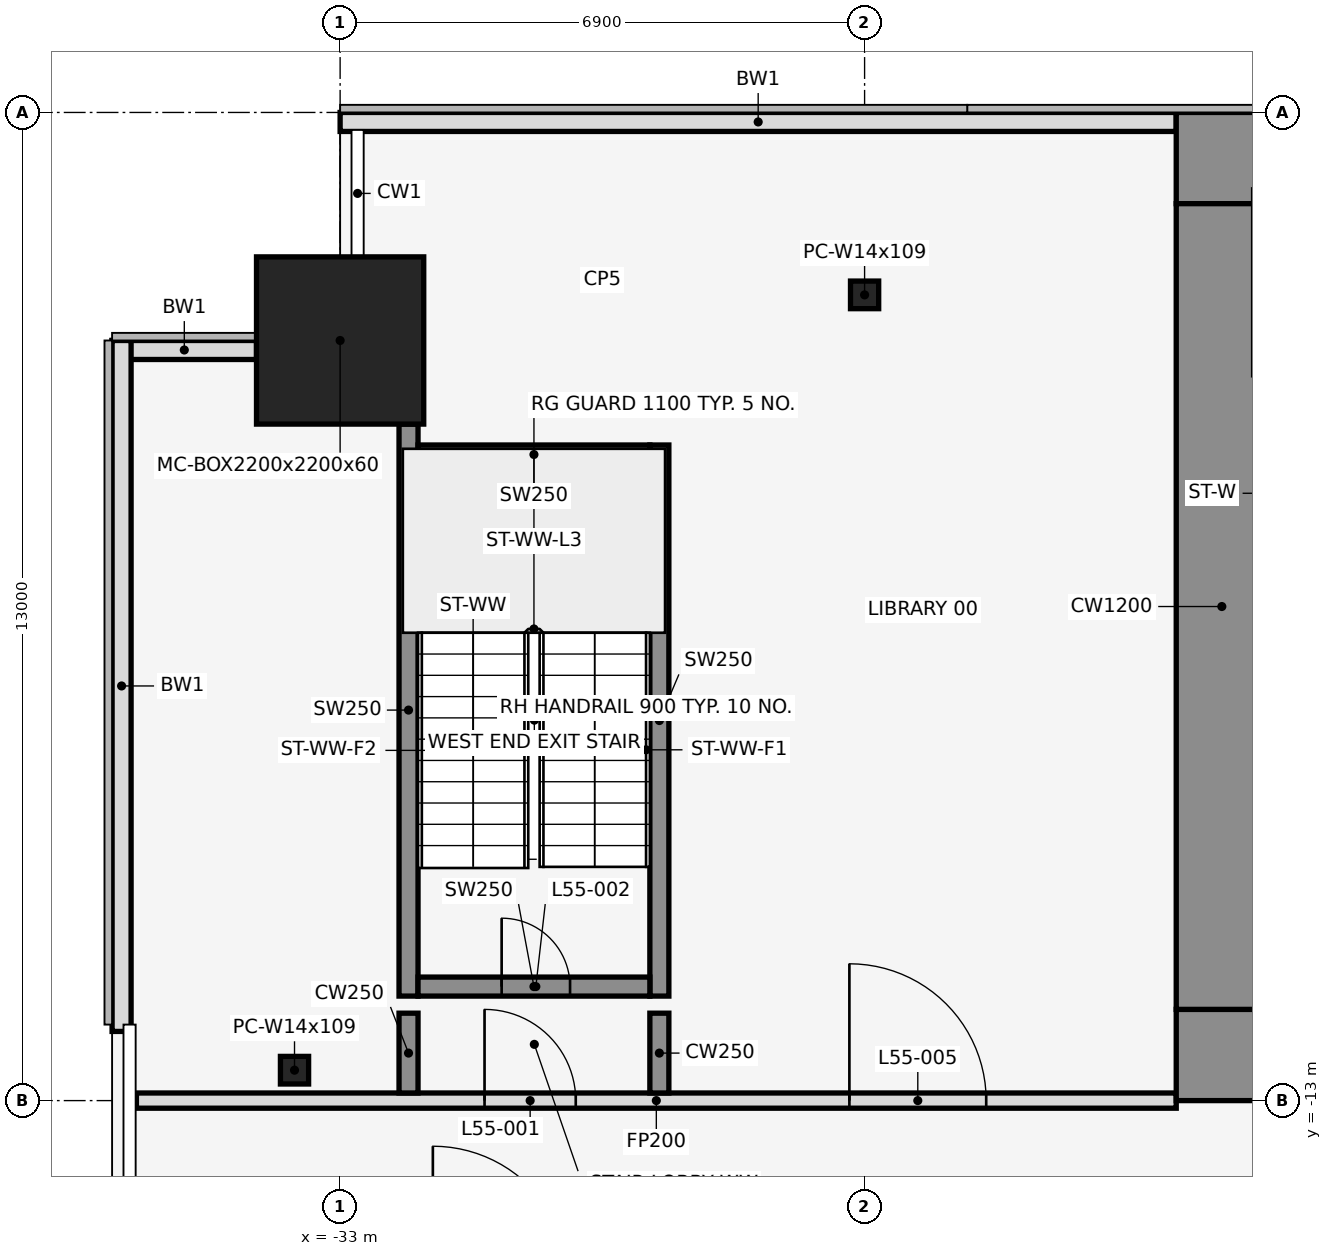
"""IFC4 building model, lengths in metres.
Left out: names, types, materials, properties, quantities, classifications, styles, units other than length and angle.
Written with IfcOpenShell. Run it as: python <this file> out.ifc"""

import sys

from ifc_helpers import new_model, si_unit, direction, frame, frame_2d, origin, origin_2d, place, context, subcontext, project, spatial, rectangle, hollow_rectangle, i_section, extrude, element, fill, save


model = new_model("IFC4")
c1 = context("Model", 3, precision=1e-05, world=origin(), true_north=direction((0.0, 1.0)))
c2 = subcontext(c1, "Body", "Model", "MODEL_VIEW")
j1 = project(units=[si_unit("LENGTHUNIT", "METRE"), si_unit("PLANEANGLEUNIT", "RADIAN")], contexts=[c1])
p1 = place(None, origin())
s1 = spatial("IfcSite", under=j1, at=p1, CompositionType="ELEMENT")
p2 = place(p1, origin())
s2 = spatial("IfcBuilding", under=s1, at=p2, CompositionType="ELEMENT")
p3 = place(p2, frame((0.0, 0.0, 245.6)))
s3 = spatial("IfcBuildingStorey", under=s2, at=p3, CompositionType="ELEMENT", Elevation=245.6)
p4 = place(p3, frame((-33.0, -3.0, 0.0), z_axis=(0.0, 0.0, 1.0), x_axis=(1.0, 0.0, 0.0)))
e1 = element("IfcColumn", 1, at=p4, inside=s3, PredefinedType="COLUMN", context=c2, shape_type="SweptSolid", body=[
    extrude(hollow_rectangle(XDim=2.2, YDim=2.2, WallThickness=0.06, at=origin_2d()), origin(), (0.0, 0.0, 1.0), 4.2),
])
for number, where, z_axis, x_axis in (
    (2, (-26.1, -2.4, 0.0), (0.0, 0.0, 1.0), (1.0, 0.0, 0.0)),
    (3, (-33.6, -12.6, 0.0), (0.0, 0.0, 1.0), (1.0, 0.0, 0.0)),
):
    element("IfcColumn", number, at=place(p3, frame(where, z_axis=z_axis, x_axis=x_axis)), inside=s3, PredefinedType="COLUMN", context=c2, shape_type="SweptSolid", body=[
        extrude(i_section(OverallWidth=0.371, OverallDepth=0.363, WebThickness=0.013, FlangeThickness=0.022, at=origin_2d()), origin(), (0.0, 0.0, 1.0), 4.2),
    ])
p5 = place(p3, frame((-22.0, -0.125, 0.0), z_axis=(0.0, 0.0, 1.0), x_axis=(-1.0, 0.0, 0.0)))
e4 = element("IfcWall", 4, at=p5, inside=s3, PredefinedType="STANDARD", context=c2, shape_type="SweptSolid", body=[
    extrude(rectangle(XDim=11.0, YDim=0.25, at=frame_2d((5.5, 0.0))), origin(), (0.0, 0.0, 1.0), 4.05),
])
p6 = place(p3, frame((-34.1, -3.125, 0.0), z_axis=(0.0, 0.0, 1.0), x_axis=(-1.0, 0.0, 0.0)))
e5 = element("IfcWall", 5, at=p6, inside=s3, PredefinedType="STANDARD", context=c2, shape_type="SweptSolid", body=[
    extrude(rectangle(XDim=1.9, YDim=0.25, at=frame_2d((0.95, 0.0))), origin(), (0.0, 0.0, 1.0), 4.05),
])
p7 = place(p3, frame((-35.875, -3.0, 0.0), z_axis=(0.0, 0.0, 1.0), x_axis=(0.0, -1.0, 0.0)))
e6 = element("IfcWall", 6, at=p7, inside=s3, PredefinedType="STANDARD", context=c2, shape_type="SweptSolid", body=[
    extrude(rectangle(XDim=9.09, YDim=0.25, at=frame_2d((4.545, 0.0))), origin(), (0.0, 0.0, 1.0), 4.05),
])
p8 = place(p3, frame((-32.1, -11.625, 0.0), z_axis=(0.0, 0.0, 1.0), x_axis=(0.0, 1.0, 0.0)))
e7 = element("IfcWall", 7, at=p8, inside=s3, PredefinedType="SHEAR", context=c2, shape_type="SweptSolid", body=[
    extrude(rectangle(XDim=7.525, YDim=0.25, at=frame_2d((3.762, 0.0))), origin(), (0.0, 0.0, 1.0), 4.2),
])
p9 = place(p3, frame((-28.8, -11.625, 0.0), z_axis=(0.0, 0.0, 1.0), x_axis=(0.0, 1.0, 0.0)))
e8 = element("IfcWall", 8, at=p9, inside=s3, PredefinedType="SHEAR", context=c2, shape_type="SweptSolid", body=[
    extrude(rectangle(XDim=7.25, YDim=0.25, at=frame_2d((3.625, 0.0))), origin(), (0.0, 0.0, 1.0), 4.2),
])
p10 = place(p3, frame((-31.975, -11.5, 0.0), z_axis=(0.0, 0.0, 1.0), x_axis=(1.0, 0.0, 0.0)))
e9 = element("IfcWall", 9, at=p10, inside=s3, PredefinedType="SHEAR", context=c2, shape_type="SweptSolid", body=[
    extrude(rectangle(XDim=3.05, YDim=0.25, at=frame_2d((1.525, 0.0))), origin(), (0.0, 0.0, 1.0), 4.2),
])
p11 = place(p10, frame((1.1, 0.0, 0.0)))
e10 = element("IfcOpeningElement", 10, at=p11, cuts=e9, PredefinedType="OPENING", context=c2, shape_type="SweptSolid", body=[
    extrude(rectangle(XDim=0.9, YDim=2.1, at=frame_2d((0.45, 1.05))), frame((0.0, 0.137, 0.0), z_axis=(0.0, -1.0, 0.0), x_axis=(1.0, 0.0, 0.0)), (0.0, 0.0, 1.0), 0.274),
])
p12 = place(p3, frame((-31.975, -4.5, 0.0), z_axis=(0.0, 0.0, 1.0), x_axis=(1.0, 0.0, 0.0)))
e11 = element("IfcWall", 11, at=p12, inside=s3, PredefinedType="SHEAR", context=c2, shape_type="SweptSolid", body=[
    extrude(rectangle(XDim=3.05, YDim=0.25, at=frame_2d((1.525, 0.0))), origin(), (0.0, 0.0, 1.0), 4.2),
])
p13 = place(p3, frame((-35.68, -13.0, 0.0), z_axis=(0.0, 0.0, 1.0), x_axis=(1.0, 0.0, 0.0)))
e12 = element("IfcWall", 12, at=p13, inside=s3, PredefinedType="PARTITIONING", context=c2, shape_type="SweptSolid", body=[
    extrude(rectangle(XDim=13.68, YDim=0.2, at=frame_2d((6.84, 0.0))), origin(), (0.0, 0.0, 1.0), 3.039),
])
p14 = place(p13, frame((4.58, 0.0, 0.0)))
e13 = element("IfcOpeningElement", 13, at=p14, cuts=e12, PredefinedType="OPENING", context=c2, shape_type="SweptSolid", body=[
    extrude(rectangle(XDim=1.2, YDim=2.1, at=frame_2d((0.6, 1.05))), frame((0.0, 0.112, 0.0), z_axis=(0.0, -1.0, 0.0), x_axis=(1.0, 0.0, 0.0)), (0.0, 0.0, 1.0), 0.224),
])
p15 = place(p13, frame((9.38, 0.0, 0.0)))
e14 = element("IfcOpeningElement", 14, at=p15, cuts=e12, PredefinedType="OPENING", context=c2, shape_type="SweptSolid", body=[
    extrude(rectangle(XDim=1.8, YDim=2.1, at=frame_2d((0.9, 1.05))), frame((0.0, 0.112, 0.0), z_axis=(0.0, -1.0, 0.0), x_axis=(1.0, 0.0, 0.0)), (0.0, 0.0, 1.0), 0.224),
])
for number, where, z_axis, x_axis in (
    (15, (-32.1, -12.9, 0.0), (0.0, 0.0, 1.0), (0.0, 1.0, 0.0)),
    (16, (-28.8, -12.9, 0.0), (0.0, 0.0, 1.0), (0.0, 1.0, 0.0)),
):
    element("IfcWall", number, at=place(p3, frame(where, z_axis=z_axis, x_axis=x_axis)), inside=s3, PredefinedType="SHEAR", context=c2, shape_type="SweptSolid", body=[
        extrude(rectangle(XDim=1.05, YDim=0.25, at=frame_2d((0.525, 0.0))), origin(), (0.0, 0.0, 1.0), 4.2),
    ])
p16 = place(p3, frame((-22.0, -0.6, 0.0), z_axis=(0.0, 0.0, 1.0), x_axis=(1.0, 0.0, 0.0)))
e17 = element("IfcWall", 17, at=p16, inside=s3, PredefinedType="SHEAR", context=c2, shape_type="SweptSolid", body=[
    extrude(rectangle(XDim=44.0, YDim=1.2, at=frame_2d((22.0, 0.0))), origin(), (0.0, 0.0, 1.0), 4.2),
])
p17 = place(p16, frame((18.55, 0.0, 0.0)))
e18 = element("IfcOpeningElement", 18, at=p17, cuts=e17, PredefinedType="OPENING", context=c2, shape_type="SweptSolid", body=[
    extrude(rectangle(XDim=0.9, YDim=2.1, at=frame_2d((0.45, 1.05))), frame((0.0, 0.612, 0.0), z_axis=(0.0, -1.0, 0.0), x_axis=(1.0, 0.0, 0.0)), (0.0, 0.0, 1.0), 1.224),
])
p18 = place(p16, frame((24.55, 0.0, 0.0)))
e19 = element("IfcOpeningElement", 19, at=p18, cuts=e17, PredefinedType="OPENING", context=c2, shape_type="SweptSolid", body=[
    extrude(rectangle(XDim=0.9, YDim=2.1, at=frame_2d((0.45, 1.05))), frame((0.0, 0.612, 0.0), z_axis=(0.0, -1.0, 0.0), x_axis=(1.0, 0.0, 0.0)), (0.0, 0.0, 1.0), 1.224),
])
p19 = place(p3, frame((-22.0, -12.4, 0.0), z_axis=(0.0, 0.0, 1.0), x_axis=(1.0, 0.0, 0.0)))
e20 = element("IfcWall", 20, at=p19, inside=s3, PredefinedType="SHEAR", context=c2, shape_type="SweptSolid", body=[
    extrude(rectangle(XDim=44.0, YDim=1.2, at=frame_2d((22.0, 0.0))), origin(), (0.0, 0.0, 1.0), 4.2),
])
p20 = place(p19, frame((2.2, 0.0, 0.0)))
e21 = element("IfcOpeningElement", 21, at=p20, cuts=e20, PredefinedType="OPENING", context=c2, shape_type="SweptSolid", body=[
    extrude(rectangle(XDim=1.2, YDim=2.1, at=frame_2d((0.6, 1.05))), frame((0.0, 0.612, 0.0), z_axis=(0.0, -1.0, 0.0), x_axis=(1.0, 0.0, 0.0)), (0.0, 0.0, 1.0), 1.224),
])
p21 = place(p19, frame((21.4, 0.0, 0.0)))
e22 = element("IfcOpeningElement", 22, at=p21, cuts=e20, PredefinedType="OPENING", context=c2, shape_type="SweptSolid", body=[
    extrude(rectangle(XDim=1.2, YDim=2.1, at=frame_2d((0.6, 1.05))), frame((0.0, 0.612, 0.0), z_axis=(0.0, -1.0, 0.0), x_axis=(1.0, 0.0, 0.0)), (0.0, 0.0, 1.0), 1.224),
])
p22 = place(p19, frame((40.6, 0.0, 0.0)))
e23 = element("IfcOpeningElement", 23, at=p22, cuts=e20, PredefinedType="OPENING", context=c2, shape_type="SweptSolid", body=[
    extrude(rectangle(XDim=1.2, YDim=2.1, at=frame_2d((0.6, 1.05))), frame((0.0, 0.612, 0.0), z_axis=(0.0, -1.0, 0.0), x_axis=(1.0, 0.0, 0.0)), (0.0, 0.0, 1.0), 1.224),
])
p23 = place(p19, frame((16.0, 0.0, 0.0)))
e24 = element("IfcOpeningElement", 24, at=p23, cuts=e20, PredefinedType="OPENING", context=c2, shape_type="SweptSolid", body=[
    extrude(rectangle(XDim=1.8, YDim=2.1, at=frame_2d((0.9, 1.05))), frame((0.0, 0.612, 0.0), z_axis=(0.0, -1.0, 0.0), x_axis=(1.0, 0.0, 0.0)), (0.0, 0.0, 1.0), 1.224),
])
p24 = place(p19, frame((6.3, 0.0, 0.0)))
e25 = element("IfcOpeningElement", 25, at=p24, cuts=e20, PredefinedType="OPENING", context=c2, shape_type="SweptSolid", body=[
    extrude(rectangle(XDim=1.2, YDim=2.1, at=frame_2d((0.6, 1.05))), frame((0.0, 0.612, 0.0), z_axis=(0.0, -1.0, 0.0), x_axis=(1.0, 0.0, 0.0)), (0.0, 0.0, 1.0), 1.224),
])
p25 = place(p19, frame((26.2, 0.0, 0.0)))
e26 = element("IfcOpeningElement", 26, at=p25, cuts=e20, PredefinedType="OPENING", context=c2, shape_type="SweptSolid", body=[
    extrude(rectangle(XDim=1.8, YDim=2.1, at=frame_2d((0.9, 1.05))), frame((0.0, 0.612, 0.0), z_axis=(0.0, -1.0, 0.0), x_axis=(1.0, 0.0, 0.0)), (0.0, 0.0, 1.0), 1.224),
])
p26 = place(p19, frame((36.5, 0.0, 0.0)))
e27 = element("IfcOpeningElement", 27, at=p26, cuts=e20, PredefinedType="OPENING", context=c2, shape_type="SweptSolid", body=[
    extrude(rectangle(XDim=1.2, YDim=2.1, at=frame_2d((0.6, 1.05))), frame((0.0, 0.612, 0.0), z_axis=(0.0, -1.0, 0.0), x_axis=(1.0, 0.0, 0.0)), (0.0, 0.0, 1.0), 1.224),
])
p27 = place(p3, frame((-21.4, -11.8, 0.0), z_axis=(0.0, 0.0, 1.0), x_axis=(0.0, 1.0, 0.0)))
e28 = element("IfcWall", 28, at=p27, inside=s3, PredefinedType="SHEAR", context=c2, shape_type="SweptSolid", body=[
    extrude(rectangle(XDim=10.6, YDim=1.2, at=frame_2d((5.3, 0.0))), origin(), (0.0, 0.0, 1.0), 4.2),
])
p28 = place(p14, origin())
e29 = element("IfcDoor", 29, at=p28, inside=s3, OperationType="SINGLE_SWING_LEFT", PredefinedType="DOOR", context=c2, shape_type="SweptSolid", body=[
    extrude(rectangle(XDim=1.2, YDim=2.1, at=frame_2d((0.6, 1.05))), frame((0.0, 0.025, 0.0), z_axis=(0.0, -1.0, 0.0), x_axis=(1.0, 0.0, 0.0)), (0.0, 0.0, 1.0), 0.05),
])
fill(e13, e29)
p29 = place(p11, origin())
e30 = element("IfcDoor", 30, at=p29, inside=s3, OperationType="SINGLE_SWING_LEFT", PredefinedType="DOOR", context=c2, shape_type="SweptSolid", body=[
    extrude(rectangle(XDim=0.9, YDim=2.1, at=frame_2d((0.45, 1.05))), frame((0.0, 0.025, 0.0), z_axis=(0.0, -1.0, 0.0), x_axis=(1.0, 0.0, 0.0)), (0.0, 0.0, 1.0), 0.05),
])
fill(e10, e30)
p30 = place(p15, origin())
e31 = element("IfcDoor", 31, at=p30, inside=s3, OperationType="SINGLE_SWING_LEFT", PredefinedType="DOOR", context=c2, shape_type="SweptSolid", body=[
    extrude(rectangle(XDim=1.8, YDim=2.1, at=frame_2d((0.9, 1.05))), frame((0.0, 0.025, 0.0), z_axis=(0.0, -1.0, 0.0), x_axis=(1.0, 0.0, 0.0)), (0.0, 0.0, 1.0), 0.05),
])
fill(e14, e31)
save(model, sys.argv[1])
